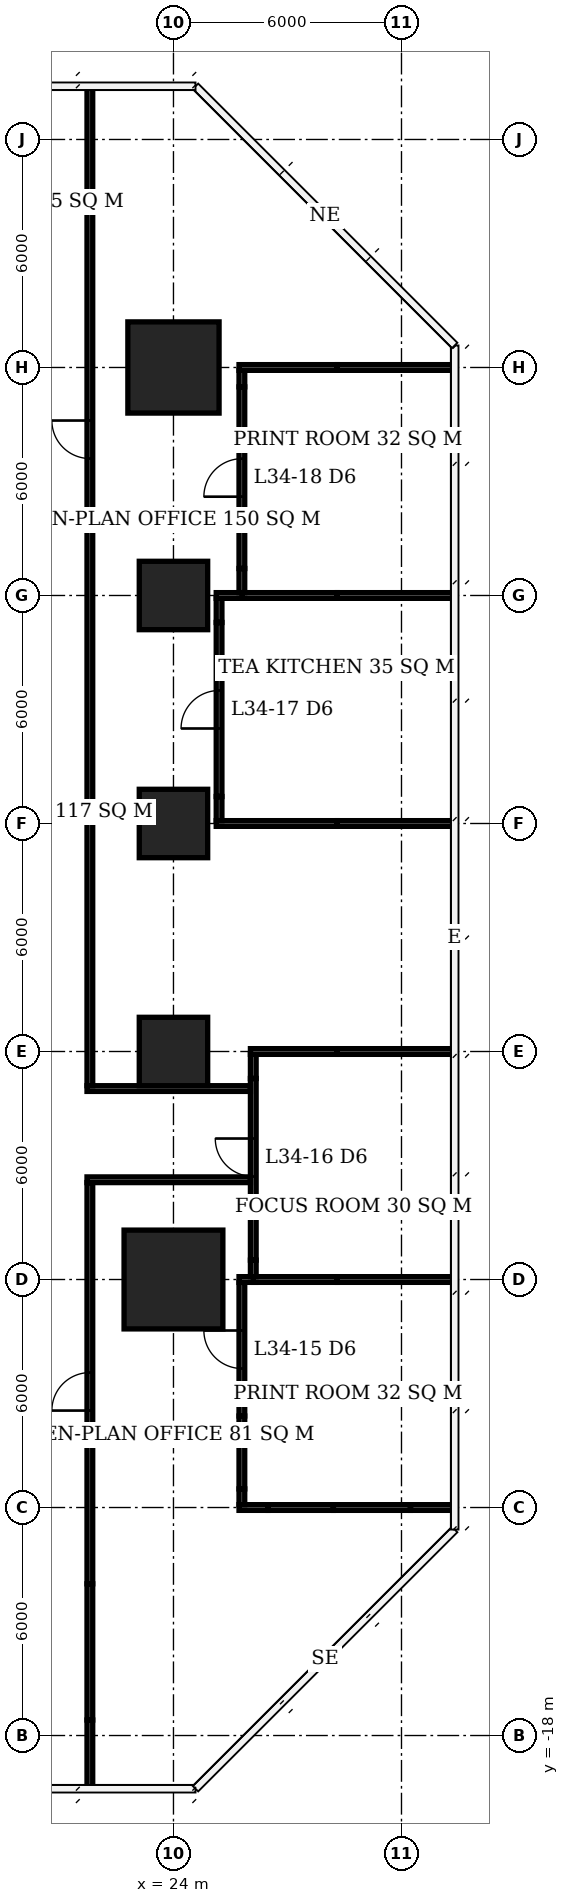
"""IFC4 building model, lengths in metres.
Left out: names, types, materials, properties, quantities, classifications, styles, units other than length and angle.
Written with IfcOpenShell. Run it as: python <this file> out.ifc"""

import sys

from ifc_helpers import new_model, si_unit, direction, frame, frame_2d, origin, origin_2d, place, context, subcontext, project, spatial, rectangle, extrude, element, fill, save


model = new_model("IFC4")
c1 = context("Model", 3, precision=1e-05, world=origin(), true_north=direction((0.0, 1.0)))
c2 = subcontext(c1, "Body", "Model", "MODEL_VIEW")
j1 = project(units=[si_unit("LENGTHUNIT", "METRE"), si_unit("PLANEANGLEUNIT", "RADIAN")], contexts=[c1])
p1 = place(None, origin())
s1 = spatial("IfcSite", under=j1, at=p1, CompositionType="ELEMENT")
p2 = place(p1, origin())
s2 = spatial("IfcBuilding", under=s1, at=p2, CompositionType="ELEMENT")
p3 = place(p2, frame((0.0, 0.0, 140.6)))
s3 = spatial("IfcBuildingStorey", under=s2, at=p3, CompositionType="ELEMENT", Elevation=140.6)
p4 = place(p3, frame((24.0, -6.0, 0.0), z_axis=(0.0, 0.0, 1.0), x_axis=(1.0, 0.0, 0.0)))
e1 = element("IfcColumn", 1, at=p4, inside=s3, PredefinedType="COLUMN", context=c2, shape_type="SweptSolid", body=[
    extrude(rectangle(XDim=2.6, YDim=2.6, at=origin_2d()), origin(), (0.0, 0.0, 1.0), 3.9),
])
for number, where, z_axis, x_axis in (
    (2, (24.0, 0.0, 0.0), (0.0, 0.0, 1.0), (1.0, 0.0, 0.0)),
    (3, (24.0, 6.0, 0.0), (0.0, 0.0, 1.0), (1.0, 0.0, 0.0)),
    (4, (24.0, 12.0, 0.0), (0.0, 0.0, 1.0), (1.0, 0.0, 0.0)),
):
    element("IfcColumn", number, at=place(p3, frame(where, z_axis=z_axis, x_axis=x_axis)), inside=s3, PredefinedType="COLUMN", context=c2, shape_type="SweptSolid", body=[
        extrude(rectangle(XDim=1.8, YDim=1.8, at=origin_2d()), origin(), (0.0, 0.0, 1.0), 3.9),
    ])
p5 = place(p3, frame((24.0, 18.0, 0.0), z_axis=(0.0, 0.0, 1.0), x_axis=(1.0, 0.0, 0.0)))
e5 = element("IfcColumn", 5, at=p5, inside=s3, PredefinedType="COLUMN", context=c2, shape_type="SweptSolid", body=[
    extrude(rectangle(XDim=2.4, YDim=2.4, at=origin_2d()), origin(), (0.0, 0.0, 1.0), 3.9),
])
p6 = place(p3, frame((25.725, -12.0, 0.0), z_axis=(0.0, 0.0, 1.0), x_axis=(1.0, 0.0, 0.0)))
e6 = element("IfcWall", 6, at=p6, inside=s3, PredefinedType="PARTITIONING", context=c2, shape_type="SweptSolid", body=[
    extrude(rectangle(XDim=0.765, YDim=0.15, at=frame_2d((0.382, 0.0))), origin(), (0.0, 0.0, 1.0), 2.65),
])
p7 = place(p3, frame((26.49, -12.0, 0.0), z_axis=(0.0, 0.0, 1.0), x_axis=(1.0, 0.0, 0.0)))
e7 = element("IfcWall", 7, at=p7, inside=s3, PredefinedType="PARTITIONING", context=c2, shape_type="SweptSolid", body=[
    extrude(rectangle(XDim=1.718, YDim=0.15, at=frame_2d((0.859, 0.0))), origin(), (0.0, 0.0, 1.0), 3.65),
])
p8 = place(p3, frame((28.208, -12.0, 0.0), z_axis=(0.0, 0.0, 1.0), x_axis=(1.0, 0.0, 0.0)))
e8 = element("IfcWall", 8, at=p8, inside=s3, PredefinedType="PARTITIONING", context=c2, shape_type="SweptSolid", body=[
    extrude(rectangle(XDim=2.029, YDim=0.15, at=frame_2d((1.015, 0.0))), origin(), (0.0, 0.0, 1.0), 2.65),
])
p9 = place(p3, frame((30.237, -12.0, 0.0), z_axis=(0.0, 0.0, 1.0), x_axis=(1.0, 0.0, 0.0)))
e9 = element("IfcWall", 9, at=p9, inside=s3, PredefinedType="PARTITIONING", context=c2, shape_type="SweptSolid", body=[
    extrude(rectangle(XDim=1.163, YDim=0.15, at=frame_2d((0.582, 0.0))), origin(), (0.0, 0.0, 1.0), 3.65),
])
p10 = place(p3, frame((25.725, -6.0, 0.0), z_axis=(0.0, 0.0, 1.0), x_axis=(1.0, 0.0, 0.0)))
e10 = element("IfcWall", 10, at=p10, inside=s3, PredefinedType="PARTITIONING", context=c2, shape_type="SweptSolid", body=[
    extrude(rectangle(XDim=0.45, YDim=0.15, at=frame_2d((0.225, 0.0))), origin(), (0.0, 0.0, 1.0), 2.65),
])
p11 = place(p3, frame((26.1, -6.0, 0.0), z_axis=(0.0, 0.0, 1.0), x_axis=(1.0, 0.0, 0.0)))
e11 = element("IfcWall", 11, at=p11, inside=s3, PredefinedType="PARTITIONING", context=c2, shape_type="SweptSolid", body=[
    extrude(rectangle(XDim=2.21, YDim=0.15, at=frame_2d((1.105, 0.0))), origin(), (0.0, 0.0, 1.0), 2.65),
])
p12 = place(p3, frame((28.31, -6.0, 0.0), z_axis=(0.0, 0.0, 1.0), x_axis=(1.0, 0.0, 0.0)))
e12 = element("IfcWall", 12, at=p12, inside=s3, PredefinedType="PARTITIONING", context=c2, shape_type="SweptSolid", body=[
    extrude(rectangle(XDim=3.09, YDim=0.15, at=frame_2d((1.545, 0.0))), origin(), (0.0, 0.0, 1.0), 3.65),
])
p13 = place(p3, frame((26.025, 0.0, 0.0), z_axis=(0.0, 0.0, 1.0), x_axis=(1.0, 0.0, 0.0)))
e13 = element("IfcWall", 13, at=p13, inside=s3, PredefinedType="PARTITIONING", context=c2, shape_type="SweptSolid", body=[
    extrude(rectangle(XDim=2.285, YDim=0.15, at=frame_2d((1.143, 0.0))), origin(), (0.0, 0.0, 1.0), 2.65),
])
p14 = place(p3, frame((28.31, 0.0, 0.0), z_axis=(0.0, 0.0, 1.0), x_axis=(1.0, 0.0, 0.0)))
e14 = element("IfcWall", 14, at=p14, inside=s3, PredefinedType="PARTITIONING", context=c2, shape_type="SweptSolid", body=[
    extrude(rectangle(XDim=3.04, YDim=0.15, at=frame_2d((1.52, 0.0))), origin(), (0.0, 0.0, 1.0), 3.65),
])
p15 = place(p3, frame((25.125, 6.0, 0.0), z_axis=(0.0, 0.0, 1.0), x_axis=(1.0, 0.0, 0.0)))
e15 = element("IfcWall", 15, at=p15, inside=s3, PredefinedType="PARTITIONING", context=c2, shape_type="SweptSolid", body=[
    extrude(rectangle(XDim=3.185, YDim=0.15, at=frame_2d((1.593, 0.0))), origin(), (0.0, 0.0, 1.0), 2.65),
])
p16 = place(p3, frame((28.31, 6.0, 0.0), z_axis=(0.0, 0.0, 1.0), x_axis=(1.0, 0.0, 0.0)))
e16 = element("IfcWall", 16, at=p16, inside=s3, PredefinedType="PARTITIONING", context=c2, shape_type="SweptSolid", body=[
    extrude(rectangle(XDim=3.04, YDim=0.15, at=frame_2d((1.52, 0.0))), origin(), (0.0, 0.0, 1.0), 3.65),
])
p17 = place(p3, frame((25.125, 12.0, 0.0), z_axis=(0.0, 0.0, 1.0), x_axis=(1.0, 0.0, 0.0)))
e17 = element("IfcWall", 17, at=p17, inside=s3, PredefinedType="PARTITIONING", context=c2, shape_type="SweptSolid", body=[
    extrude(rectangle(XDim=0.75, YDim=0.15, at=frame_2d((0.375, 0.0))), origin(), (0.0, 0.0, 1.0), 2.65),
])
p18 = place(p3, frame((25.8, 12.0, 0.0), z_axis=(0.0, 0.0, 1.0), x_axis=(1.0, 0.0, 0.0)))
e18 = element("IfcWall", 18, at=p18, inside=s3, PredefinedType="PARTITIONING", context=c2, shape_type="SweptSolid", body=[
    extrude(rectangle(XDim=2.51, YDim=0.15, at=frame_2d((1.255, 0.0))), origin(), (0.0, 0.0, 1.0), 2.65),
])
p19 = place(p3, frame((28.31, 12.0, 0.0), z_axis=(0.0, 0.0, 1.0), x_axis=(1.0, 0.0, 0.0)))
e19 = element("IfcWall", 19, at=p19, inside=s3, PredefinedType="PARTITIONING", context=c2, shape_type="SweptSolid", body=[
    extrude(rectangle(XDim=3.09, YDim=0.15, at=frame_2d((1.545, 0.0))), origin(), (0.0, 0.0, 1.0), 3.65),
])
p20 = place(p3, frame((25.725, 18.0, 0.0), z_axis=(0.0, 0.0, 1.0), x_axis=(1.0, 0.0, 0.0)))
e20 = element("IfcWall", 20, at=p20, inside=s3, PredefinedType="PARTITIONING", context=c2, shape_type="SweptSolid", body=[
    extrude(rectangle(XDim=2.585, YDim=0.15, at=frame_2d((1.292, 0.0))), origin(), (0.0, 0.0, 1.0), 2.65),
])
p21 = place(p3, frame((28.31, 18.0, 0.0), z_axis=(0.0, 0.0, 1.0), x_axis=(1.0, 0.0, 0.0)))
e21 = element("IfcWall", 21, at=p21, inside=s3, PredefinedType="PARTITIONING", context=c2, shape_type="SweptSolid", body=[
    extrude(rectangle(XDim=3.09, YDim=0.15, at=frame_2d((1.545, 0.0))), origin(), (0.0, 0.0, 1.0), 3.65),
])
p22 = place(p3, frame((25.2, 6.075, 0.0), z_axis=(0.0, 0.0, 1.0), x_axis=(0.0, 1.0, 0.0)))
e22 = element("IfcWall", 22, at=p22, inside=s3, PredefinedType="PARTITIONING", context=c2, shape_type="SweptSolid", body=[
    extrude(rectangle(XDim=0.635, YDim=0.15, at=frame_2d((0.317, 0.0))), origin(), (0.0, 0.0, 1.0), 2.65),
])
p23 = place(p3, frame((25.2, 6.71, 0.0), z_axis=(0.0, 0.0, 1.0), x_axis=(0.0, 1.0, 0.0)))
e23 = element("IfcWall", 23, at=p23, inside=s3, PredefinedType="PARTITIONING", context=c2, shape_type="SweptSolid", body=[
    extrude(rectangle(XDim=4.58, YDim=0.15, at=frame_2d((2.29, 0.0))), origin(), (0.0, 0.0, 1.0), 3.65),
])
p24 = place(p23, frame((1.79, 0.0, 0.0)))
e24 = element("IfcOpeningElement", 24, at=p24, cuts=e23, PredefinedType="OPENING", context=c2, shape_type="SweptSolid", body=[
    extrude(rectangle(XDim=1.0, YDim=2.1, at=frame_2d((0.5, 1.05))), frame((0.0, 0.085, 0.0), z_axis=(0.0, -1.0, 0.0), x_axis=(1.0, 0.0, 0.0)), (0.0, 0.0, 1.0), 0.17),
])
p25 = place(p3, frame((25.2, 11.29, 0.0), z_axis=(0.0, 0.0, 1.0), x_axis=(0.0, 1.0, 0.0)))
e25 = element("IfcWall", 25, at=p25, inside=s3, PredefinedType="PARTITIONING", context=c2, shape_type="SweptSolid", body=[
    extrude(rectangle(XDim=0.635, YDim=0.15, at=frame_2d((0.317, 0.0))), origin(), (0.0, 0.0, 1.0), 2.65),
])
p26 = place(p3, frame((25.8, -11.925, 0.0), z_axis=(0.0, 0.0, 1.0), x_axis=(0.0, 1.0, 0.0)))
e26 = element("IfcWall", 26, at=p26, inside=s3, PredefinedType="PARTITIONING", context=c2, shape_type="SweptSolid", body=[
    extrude(rectangle(XDim=0.415, YDim=0.15, at=frame_2d((0.208, 0.0))), origin(), (0.0, 0.0, 1.0), 2.65),
])
p27 = place(p3, frame((25.8, -11.51, 0.0), z_axis=(0.0, 0.0, 1.0), x_axis=(0.0, 1.0, 0.0)))
e27 = element("IfcWall", 27, at=p27, inside=s3, PredefinedType="PARTITIONING", context=c2, shape_type="SweptSolid", body=[
    extrude(rectangle(XDim=1.918, YDim=0.15, at=frame_2d((0.959, 0.0))), origin(), (0.0, 0.0, 1.0), 3.65),
])
p28 = place(p3, frame((25.8, -9.592, 0.0), z_axis=(0.0, 0.0, 1.0), x_axis=(0.0, 1.0, 0.0)))
e28 = element("IfcWall", 28, at=p28, inside=s3, PredefinedType="PARTITIONING", context=c2, shape_type="SweptSolid", body=[
    extrude(rectangle(XDim=3.517, YDim=0.15, at=frame_2d((1.759, 0.0))), origin(), (0.0, 0.0, 1.0), 2.65),
])
p29 = place(p28, frame((1.25, 0.0, 0.0)))
e29 = element("IfcOpeningElement", 29, at=p29, cuts=e28, PredefinedType="OPENING", context=c2, shape_type="SweptSolid", body=[
    extrude(rectangle(XDim=1.0, YDim=2.1, at=frame_2d((0.5, 1.05))), frame((0.0, 0.085, 0.0), z_axis=(0.0, -1.0, 0.0), x_axis=(1.0, 0.0, 0.0)), (0.0, 0.0, 1.0), 0.17),
])
p30 = place(p3, frame((25.8, 12.075, 0.0), z_axis=(0.0, 0.0, 1.0), x_axis=(0.0, 1.0, 0.0)))
e30 = element("IfcWall", 30, at=p30, inside=s3, PredefinedType="PARTITIONING", context=c2, shape_type="SweptSolid", body=[
    extrude(rectangle(XDim=0.635, YDim=0.15, at=frame_2d((0.317, 0.0))), origin(), (0.0, 0.0, 1.0), 2.65),
])
p31 = place(p3, frame((25.8, 12.71, 0.0), z_axis=(0.0, 0.0, 1.0), x_axis=(0.0, 1.0, 0.0)))
e31 = element("IfcWall", 31, at=p31, inside=s3, PredefinedType="PARTITIONING", context=c2, shape_type="SweptSolid", body=[
    extrude(rectangle(XDim=4.78, YDim=0.15, at=frame_2d((2.39, 0.0))), origin(), (0.0, 0.0, 1.0), 3.65),
])
p32 = place(p31, frame((1.89, 0.0, 0.0)))
e32 = element("IfcOpeningElement", 32, at=p32, cuts=e31, PredefinedType="OPENING", context=c2, shape_type="SweptSolid", body=[
    extrude(rectangle(XDim=1.0, YDim=2.1, at=frame_2d((0.5, 1.05))), frame((0.0, 0.085, 0.0), z_axis=(0.0, -1.0, 0.0), x_axis=(1.0, 0.0, 0.0)), (0.0, 0.0, 1.0), 0.17),
])
for number, where, z_axis, x_axis in (
    (33, (25.8, 17.49, 0.0), (0.0, 0.0, 1.0), (0.0, 1.0, 0.0)),
    (34, (26.1, -5.925, 0.0), (0.0, 0.0, 1.0), (0.0, 1.0, 0.0)),
):
    element("IfcWall", number, at=place(p3, frame(where, z_axis=z_axis, x_axis=x_axis)), inside=s3, PredefinedType="PARTITIONING", context=c2, shape_type="SweptSolid", body=[
        extrude(rectangle(XDim=0.435, YDim=0.15, at=frame_2d((0.218, 0.0))), origin(), (0.0, 0.0, 1.0), 2.65),
    ])
p33 = place(p3, frame((26.1, -5.49, 0.0), z_axis=(0.0, 0.0, 1.0), x_axis=(0.0, 1.0, 0.0)))
e35 = element("IfcWall", 35, at=p33, inside=s3, PredefinedType="PARTITIONING", context=c2, shape_type="SweptSolid", body=[
    extrude(rectangle(XDim=4.78, YDim=0.15, at=frame_2d((2.39, 0.0))), origin(), (0.0, 0.0, 1.0), 3.65),
])
p34 = place(p33, frame((2.2, 0.0, 0.0)))
e36 = element("IfcOpeningElement", 36, at=p34, cuts=e35, PredefinedType="OPENING", context=c2, shape_type="SweptSolid", body=[
    extrude(rectangle(XDim=1.0, YDim=2.1, at=frame_2d((0.5, 1.05))), frame((0.0, 0.085, 0.0), z_axis=(0.0, -1.0, 0.0), x_axis=(1.0, 0.0, 0.0)), (0.0, 0.0, 1.0), 0.17),
])
p35 = place(p3, frame((26.1, -0.71, 0.0), z_axis=(0.0, 0.0, 1.0), x_axis=(0.0, 1.0, 0.0)))
e37 = element("IfcWall", 37, at=p35, inside=s3, PredefinedType="PARTITIONING", context=c2, shape_type="SweptSolid", body=[
    extrude(rectangle(XDim=0.635, YDim=0.15, at=frame_2d((0.317, 0.0))), origin(), (0.0, 0.0, 1.0), 2.65),
])
p36 = place(p3, frame((21.8, -19.4, 0.0), z_axis=(0.0, 0.0, 1.0), x_axis=(0.0, 1.0, 0.0)))
e38 = element("IfcWall", 38, at=p36, inside=s3, PredefinedType="PARTITIONING", context=c2, shape_type="SweptSolid", body=[
    extrude(rectangle(XDim=1.808, YDim=0.15, at=frame_2d((0.904, 0.0))), origin(), (0.0, 0.0, 1.0), 3.65),
])
p37 = place(p3, frame((21.8, -17.592, 0.0), z_axis=(0.0, 0.0, 1.0), x_axis=(0.0, 1.0, 0.0)))
e39 = element("IfcWall", 39, at=p37, inside=s3, PredefinedType="PARTITIONING", context=c2, shape_type="SweptSolid", body=[
    extrude(rectangle(XDim=3.584, YDim=0.15, at=frame_2d((1.792, 0.0))), origin(), (0.0, 0.0, 1.0), 2.65),
])
p38 = place(p3, frame((21.8, -14.008, 0.0), z_axis=(0.0, 0.0, 1.0), x_axis=(0.0, 1.0, 0.0)))
e40 = element("IfcWall", 40, at=p38, inside=s3, PredefinedType="PARTITIONING", context=c2, shape_type="SweptSolid", body=[
    extrude(rectangle(XDim=10.558, YDim=0.15, at=frame_2d((5.279, 0.0))), origin(), (0.0, 0.0, 1.0), 3.65),
])
p39 = place(p38, frame((4.559, 0.0, 0.0)))
e41 = element("IfcOpeningElement", 41, at=p39, cuts=e40, PredefinedType="OPENING", context=c2, shape_type="SweptSolid", body=[
    extrude(rectangle(XDim=1.0, YDim=2.1, at=frame_2d((0.5, 1.05))), frame((0.0, 0.085, 0.0), z_axis=(0.0, -1.0, 0.0), x_axis=(1.0, 0.0, 0.0)), (0.0, 0.0, 1.0), 0.17),
])
p40 = place(p3, frame((21.725, -3.375, 0.0), z_axis=(0.0, 0.0, 1.0), x_axis=(1.0, 0.0, 0.0)))
e42 = element("IfcWall", 42, at=p40, inside=s3, PredefinedType="PARTITIONING", context=c2, shape_type="SweptSolid", body=[
    extrude(rectangle(XDim=4.3, YDim=0.15, at=frame_2d((2.15, 0.0))), origin(), (0.0, 0.0, 1.0), 3.65),
])
p41 = place(p3, frame((21.8, -0.9, 0.0), z_axis=(0.0, 0.0, 1.0), x_axis=(0.0, 1.0, 0.0)))
e43 = element("IfcWall", 43, at=p41, inside=s3, PredefinedType="PARTITIONING", context=c2, shape_type="SweptSolid", body=[
    extrude(rectangle(XDim=26.3, YDim=0.15, at=frame_2d((13.15, 0.0))), origin(), (0.0, 0.0, 1.0), 3.65),
])
p42 = place(p41, frame((16.504, 0.0, 0.0)))
e44 = element("IfcOpeningElement", 44, at=p42, cuts=e43, PredefinedType="OPENING", context=c2, shape_type="SweptSolid", body=[
    extrude(rectangle(XDim=1.0, YDim=2.1, at=frame_2d((0.5, 1.05))), frame((0.0, 0.085, 0.0), z_axis=(0.0, -1.0, 0.0), x_axis=(1.0, 0.0, 0.0)), (0.0, 0.0, 1.0), 0.17),
])
p43 = place(p3, frame((21.725, -0.975, 0.0), z_axis=(0.0, 0.0, 1.0), x_axis=(1.0, 0.0, 0.0)))
e45 = element("IfcWall", 45, at=p43, inside=s3, PredefinedType="PARTITIONING", context=c2, shape_type="SweptSolid", body=[
    extrude(rectangle(XDim=4.3, YDim=0.15, at=frame_2d((2.15, 0.0))), origin(), (0.0, 0.0, 1.0), 3.65),
])
p44 = place(p29, origin())
e46 = element("IfcDoor", 46, at=p44, inside=s3, OperationType="SINGLE_SWING_RIGHT", PredefinedType="DOOR", context=c2, shape_type="SweptSolid", body=[
    extrude(rectangle(XDim=1.0, YDim=2.1, at=frame_2d((0.5, 1.05))), frame((0.0, 0.025, 0.0), z_axis=(0.0, -1.0, 0.0), x_axis=(1.0, 0.0, 0.0)), (0.0, 0.0, 1.0), 0.05),
])
fill(e29, e46)
p45 = place(p34, origin())
e47 = element("IfcDoor", 47, at=p45, inside=s3, OperationType="SINGLE_SWING_RIGHT", PredefinedType="DOOR", context=c2, shape_type="SweptSolid", body=[
    extrude(rectangle(XDim=1.0, YDim=2.1, at=frame_2d((0.5, 1.05))), frame((0.0, 0.025, 0.0), z_axis=(0.0, -1.0, 0.0), x_axis=(1.0, 0.0, 0.0)), (0.0, 0.0, 1.0), 0.05),
])
fill(e36, e47)
p46 = place(p24, origin())
e48 = element("IfcDoor", 48, at=p46, inside=s3, OperationType="SINGLE_SWING_LEFT", PredefinedType="DOOR", context=c2, shape_type="SweptSolid", body=[
    extrude(rectangle(XDim=1.0, YDim=2.1, at=frame_2d((0.5, 1.05))), frame((0.0, 0.025, 0.0), z_axis=(0.0, -1.0, 0.0), x_axis=(1.0, 0.0, 0.0)), (0.0, 0.0, 1.0), 0.05),
])
fill(e24, e48)
p47 = place(p32, origin())
e49 = element("IfcDoor", 49, at=p47, inside=s3, OperationType="SINGLE_SWING_LEFT", PredefinedType="DOOR", context=c2, shape_type="SweptSolid", body=[
    extrude(rectangle(XDim=1.0, YDim=2.1, at=frame_2d((0.5, 1.05))), frame((0.0, 0.025, 0.0), z_axis=(0.0, -1.0, 0.0), x_axis=(1.0, 0.0, 0.0)), (0.0, 0.0, 1.0), 0.05),
])
fill(e32, e49)
p48 = place(p39, origin())
e50 = element("IfcDoor", 50, at=p48, inside=s3, OperationType="SINGLE_SWING_LEFT", PredefinedType="DOOR", context=c2, shape_type="SweptSolid", body=[
    extrude(rectangle(XDim=1.0, YDim=2.1, at=frame_2d((0.5, 1.05))), frame((0.0, 0.025, 0.0), z_axis=(0.0, -1.0, 0.0), x_axis=(1.0, 0.0, 0.0)), (0.0, 0.0, 1.0), 0.05),
])
fill(e41, e50)
p49 = place(p42, origin())
e51 = element("IfcDoor", 51, at=p49, inside=s3, OperationType="SINGLE_SWING_RIGHT", PredefinedType="DOOR", context=c2, shape_type="SweptSolid", body=[
    extrude(rectangle(XDim=1.0, YDim=2.1, at=frame_2d((0.5, 1.05))), frame((0.0, 0.025, 0.0), z_axis=(0.0, -1.0, 0.0), x_axis=(1.0, 0.0, 0.0)), (0.0, 0.0, 1.0), 0.05),
])
fill(e44, e51)
save(model, sys.argv[1])
